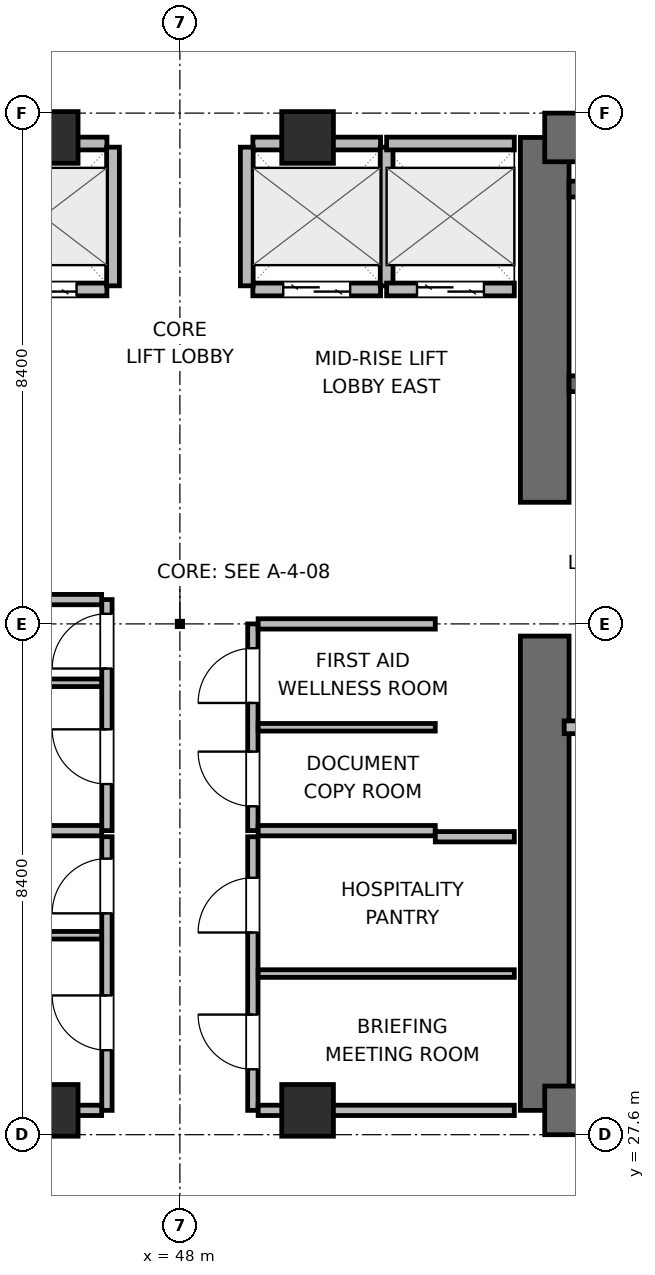
"""IFC4 building model, lengths in metres.
Left out: names, types, materials, properties, quantities, classifications, styles, units other than length and angle.
Written with IfcOpenShell. Run it as: python <this file> out.ifc"""

import sys

from ifc_helpers import new_model, si_unit, direction, frame, frame_2d, origin, origin_2d, place, context, subcontext, project, spatial, rectangle, extrude, element, fill, save


model = new_model("IFC4")
c1 = context("Model", 3, precision=1e-05, world=origin(), true_north=direction((0.0, 1.0)))
c2 = subcontext(c1, "Body", "Model", "MODEL_VIEW")
j1 = project(units=[si_unit("LENGTHUNIT", "METRE"), si_unit("PLANEANGLEUNIT", "RADIAN")], contexts=[c1])
p1 = place(None, origin())
s1 = spatial("IfcSite", under=j1, at=p1, CompositionType="ELEMENT")
p2 = place(p1, origin())
s2 = spatial("IfcBuilding", under=s1, at=p2, CompositionType="ELEMENT")
p3 = place(p2, frame((0.0, 0.0, 177.9)))
s3 = spatial("IfcBuildingStorey", under=s2, at=p3, CompositionType="ELEMENT", Elevation=177.9)
p4 = place(p3, frame((54.0, 28.0, 0.0), z_axis=(0.0, 0.0, 1.0), x_axis=(0.0, 1.0, 0.0)))
e1 = element("IfcWall", 1, at=p4, inside=s3, PredefinedType="SHEAR", context=c2, shape_type="SweptSolid", body=[
    extrude(rectangle(XDim=7.8, YDim=0.8, at=frame_2d((3.9, 0.0))), origin(), (0.0, 0.0, 1.0), 3.9),
])
p5 = place(p3, frame((54.0, 38.0, 0.0), z_axis=(0.0, 0.0, 1.0), x_axis=(0.0, 1.0, 0.0)))
e2 = element("IfcWall", 2, at=p5, inside=s3, PredefinedType="SHEAR", context=c2, shape_type="SweptSolid", body=[
    extrude(rectangle(XDim=6.0, YDim=0.8, at=frame_2d((3.0, 0.0))), origin(), (0.0, 0.0, 1.0), 3.9),
])
p6 = place(p3, frame((54.0, 28.0, 0.0), z_axis=(0.0, 0.0, 1.0), x_axis=(1.0, 0.0, 0.0)))
e3 = element("IfcWall", 3, at=p6, inside=s3, PredefinedType="SHEAR", context=c2, shape_type="SweptSolid", body=[
    extrude(rectangle(XDim=9.2, YDim=0.8, at=frame_2d((4.6, 0.0))), origin(), (0.0, 0.0, 1.0), 3.9),
])
p7 = place(p6, frame((3.975, 0.0, 0.0)))
e4 = element("IfcOpeningElement", 4, at=p7, cuts=e3, PredefinedType="OPENING", context=c2, shape_type="SweptSolid", body=[
    extrude(rectangle(XDim=1.05, YDim=2.04, at=frame_2d((0.525, 1.02))), frame((0.0, 0.41, 0.0), z_axis=(0.0, -1.0, 0.0), x_axis=(1.0, 0.0, 0.0)), (0.0, 0.0, 1.0), 0.82),
])
p8 = place(p3, frame((54.0, 44.0, 0.0), z_axis=(0.0, 0.0, 1.0), x_axis=(1.0, 0.0, 0.0)))
e5 = element("IfcWall", 5, at=p8, inside=s3, PredefinedType="SHEAR", context=c2, shape_type="SweptSolid", body=[
    extrude(rectangle(XDim=9.2, YDim=0.8, at=frame_2d((4.6, 0.0))), origin(), (0.0, 0.0, 1.0), 3.9),
])
p9 = place(p3, frame((54.4, 39.95, 0.0), z_axis=(0.0, 0.0, 1.0), x_axis=(1.0, 0.0, 0.0)))
e6 = element("IfcWall", 6, at=p9, inside=s3, PredefinedType="SHEAR", context=c2, shape_type="SweptSolid", body=[
    extrude(rectangle(XDim=8.4, YDim=0.26, at=frame_2d((4.2, 0.0))), origin(), (0.0, 0.0, 1.0), 3.9),
])
p10 = place(p9, frame((0.8, 0.0, 0.0)))
e7 = element("IfcOpeningElement", 7, at=p10, cuts=e6, PredefinedType="OPENING", context=c2, shape_type="SweptSolid", body=[
    extrude(rectangle(XDim=1.0, YDim=2.04, at=frame_2d((0.5, 1.02))), frame((0.0, 0.14, 0.0), z_axis=(0.0, -1.0, 0.0), x_axis=(1.0, 0.0, 0.0)), (0.0, 0.0, 1.0), 0.28),
])
p11 = place(p3, frame((54.4, 43.15, 0.0), z_axis=(0.0, 0.0, 1.0), x_axis=(1.0, 0.0, 0.0)))
e8 = element("IfcWall", 8, at=p11, inside=s3, PredefinedType="SHEAR", context=c2, shape_type="SweptSolid", body=[
    extrude(rectangle(XDim=8.4, YDim=0.26, at=frame_2d((4.2, 0.0))), origin(), (0.0, 0.0, 1.0), 3.9),
])
for number, where, z_axis, x_axis in (
    (9, (45.9, 28.0, 0.0), (0.0, 0.0, 1.0), (1.0, 0.0, 0.0)),
    (10, (50.1, 28.0, 0.0), (0.0, 0.0, 1.0), (1.0, 0.0, 0.0)),
    (11, (45.9, 44.0, 0.0), (0.0, 0.0, 1.0), (1.0, 0.0, 0.0)),
    (12, (50.1, 44.0, 0.0), (0.0, 0.0, 1.0), (1.0, 0.0, 0.0)),
):
    element("IfcColumn", number, at=place(p3, frame(where, z_axis=z_axis, x_axis=x_axis)), inside=s3, PredefinedType="COLUMN", context=c2, shape_type="SweptSolid", body=[
        extrude(rectangle(XDim=0.85, YDim=0.85, at=origin_2d()), origin(), (0.0, 0.0, 1.0), 3.9),
    ])
p12 = place(p3, frame((54.32, 34.3, 0.0), z_axis=(0.0, 0.0, 1.0), x_axis=(1.0, 0.0, 0.0)))
e13 = element("IfcWall", 13, at=p12, inside=s3, PredefinedType="PARTITIONING", context=c2, shape_type="SweptSolid", body=[
    extrude(rectangle(XDim=3.48, YDim=0.21, at=frame_2d((1.74, 0.0))), origin(), (0.0, 0.0, 1.0), 3.68),
])
p13 = place(p3, frame((44.7, 41.5, 0.0), z_axis=(0.0, 0.0, 1.0), x_axis=(1.0, 0.0, 0.0)))
e14 = element("IfcWall", 14, at=p13, inside=s3, PredefinedType="PARTITIONING", context=c2, shape_type="SweptSolid", body=[
    extrude(rectangle(XDim=2.1, YDim=0.21, at=frame_2d((1.05, 0.0))), origin(), (0.0, 0.0, 1.0), 3.68),
])
p14 = place(p13, frame((0.5, 0.0, 0.0)))
e15 = element("IfcOpeningElement", 15, at=p14, cuts=e14, PredefinedType="OPENING", context=c2, shape_type="SweptSolid", body=[
    extrude(rectangle(XDim=1.1, YDim=2.04, at=frame_2d((0.55, 1.02))), frame((0.0, 0.115, 0.0), z_axis=(0.0, -1.0, 0.0), x_axis=(1.0, 0.0, 0.0)), (0.0, 0.0, 1.0), 0.23),
])
p15 = place(p3, frame((44.7, 43.9, 0.0), z_axis=(0.0, 0.0, 1.0), x_axis=(1.0, 0.0, 0.0)))
e16 = element("IfcWall", 16, at=p15, inside=s3, PredefinedType="PARTITIONING", context=c2, shape_type="SweptSolid", body=[
    extrude(rectangle(XDim=2.1, YDim=0.21, at=frame_2d((1.05, 0.0))), origin(), (0.0, 0.0, 1.0), 2.765),
])
p16 = place(p3, frame((46.9, 41.56, 0.0), z_axis=(0.0, 0.0, 1.0), x_axis=(0.0, 1.0, 0.0)))
e17 = element("IfcWall", 17, at=p16, inside=s3, PredefinedType="PARTITIONING", context=c2, shape_type="SweptSolid", body=[
    extrude(rectangle(XDim=2.28, YDim=0.21, at=frame_2d((1.14, 0.0))), origin(), (0.0, 0.0, 1.0), 3.68),
])
p17 = place(p3, frame((49.2, 41.5, 0.0), z_axis=(0.0, 0.0, 1.0), x_axis=(1.0, 0.0, 0.0)))
e18 = element("IfcWall", 18, at=p17, inside=s3, PredefinedType="PARTITIONING", context=c2, shape_type="SweptSolid", body=[
    extrude(rectangle(XDim=2.1, YDim=0.21, at=frame_2d((1.05, 0.0))), origin(), (0.0, 0.0, 1.0), 3.68),
])
p18 = place(p17, frame((0.5, 0.0, 0.0)))
e19 = element("IfcOpeningElement", 19, at=p18, cuts=e18, PredefinedType="OPENING", context=c2, shape_type="SweptSolid", body=[
    extrude(rectangle(XDim=1.1, YDim=2.04, at=frame_2d((0.55, 1.02))), frame((0.0, 0.115, 0.0), z_axis=(0.0, -1.0, 0.0), x_axis=(1.0, 0.0, 0.0)), (0.0, 0.0, 1.0), 0.23),
])
p19 = place(p3, frame((49.2, 43.9, 0.0), z_axis=(0.0, 0.0, 1.0), x_axis=(1.0, 0.0, 0.0)))
e20 = element("IfcWall", 20, at=p19, inside=s3, PredefinedType="PARTITIONING", context=c2, shape_type="SweptSolid", body=[
    extrude(rectangle(XDim=2.1, YDim=0.21, at=frame_2d((1.05, 0.0))), origin(), (0.0, 0.0, 1.0), 2.765),
])
for number, where, z_axis, x_axis in (
    (21, (49.1, 41.56, 0.0), (0.0, 0.0, 1.0), (0.0, 1.0, 0.0)),
    (22, (51.4, 41.56, 0.0), (0.0, 0.0, 1.0), (0.0, 1.0, 0.0)),
):
    element("IfcWall", number, at=place(p3, frame(where, z_axis=z_axis, x_axis=x_axis)), inside=s3, PredefinedType="PARTITIONING", context=c2, shape_type="SweptSolid", body=[
        extrude(rectangle(XDim=2.28, YDim=0.21, at=frame_2d((1.14, 0.0))), origin(), (0.0, 0.0, 1.0), 3.68),
    ])
p20 = place(p3, frame((51.4, 41.5, 0.0), z_axis=(0.0, 0.0, 1.0), x_axis=(1.0, 0.0, 0.0)))
e23 = element("IfcWall", 23, at=p20, inside=s3, PredefinedType="PARTITIONING", context=c2, shape_type="SweptSolid", body=[
    extrude(rectangle(XDim=2.1, YDim=0.21, at=frame_2d((1.05, 0.0))), origin(), (0.0, 0.0, 1.0), 3.68),
])
p21 = place(p20, frame((0.5, 0.0, 0.0)))
e24 = element("IfcOpeningElement", 24, at=p21, cuts=e23, PredefinedType="OPENING", context=c2, shape_type="SweptSolid", body=[
    extrude(rectangle(XDim=1.1, YDim=2.04, at=frame_2d((0.55, 1.02))), frame((0.0, 0.115, 0.0), z_axis=(0.0, -1.0, 0.0), x_axis=(1.0, 0.0, 0.0)), (0.0, 0.0, 1.0), 0.23),
])
p22 = place(p3, frame((51.4, 43.9, 0.0), z_axis=(0.0, 0.0, 1.0), x_axis=(1.0, 0.0, 0.0)))
e25 = element("IfcWall", 25, at=p22, inside=s3, PredefinedType="PARTITIONING", context=c2, shape_type="SweptSolid", body=[
    extrude(rectangle(XDim=2.1, YDim=0.21, at=frame_2d((1.05, 0.0))), origin(), (0.0, 0.0, 1.0), 2.765),
])
p23 = place(p3, frame((46.8, 32.6, 0.0), z_axis=(0.0, 0.0, 1.0), x_axis=(0.0, 1.0, 0.0)))
e26 = element("IfcWall", 26, at=p23, inside=s3, PredefinedType="PARTITIONING", context=c2, shape_type="SweptSolid", body=[
    extrude(rectangle(XDim=3.8, YDim=0.17, at=frame_2d((1.9, 0.0))), origin(), (0.0, 0.0, 1.0), 3.68),
])
p24 = place(p23, frame((0.766, 0.0, 0.0)))
e27 = element("IfcOpeningElement", 27, at=p24, cuts=e26, PredefinedType="OPENING", context=c2, shape_type="SweptSolid", body=[
    extrude(rectangle(XDim=0.9, YDim=2.02, at=frame_2d((0.45, 1.01))), frame((0.0, 0.095, 0.0), z_axis=(0.0, -1.0, 0.0), x_axis=(1.0, 0.0, 0.0)), (0.0, 0.0, 1.0), 0.19),
])
p25 = place(p23, frame((2.666, 0.0, 0.0)))
e28 = element("IfcOpeningElement", 28, at=p25, cuts=e26, PredefinedType="OPENING", context=c2, shape_type="SweptSolid", body=[
    extrude(rectangle(XDim=0.9, YDim=2.02, at=frame_2d((0.45, 1.01))), frame((0.0, 0.095, 0.0), z_axis=(0.0, -1.0, 0.0), x_axis=(1.0, 0.0, 0.0)), (0.0, 0.0, 1.0), 0.19),
])
for number, where, z_axis, x_axis in (
    (29, (43.8, 32.6, 0.0), (0.0, 0.0, 1.0), (1.0, 0.0, 0.0)),
    (30, (43.8, 36.4, 0.0), (0.0, 0.0, 1.0), (1.0, 0.0, 0.0)),
):
    element("IfcWall", number, at=place(p3, frame(where, z_axis=z_axis, x_axis=x_axis)), inside=s3, PredefinedType="PARTITIONING", context=c2, shape_type="SweptSolid", body=[
        extrude(rectangle(XDim=2.913, YDim=0.17, at=frame_2d((1.457, 0.0))), origin(), (0.0, 0.0, 1.0), 3.68),
    ])
p26 = place(p3, frame((43.8, 35.032, 0.0), z_axis=(0.0, 0.0, 1.0), x_axis=(1.0, 0.0, 0.0)))
e31 = element("IfcWall", 31, at=p26, inside=s3, PredefinedType="PARTITIONING", context=c2, shape_type="SweptSolid", body=[
    extrude(rectangle(XDim=2.913, YDim=0.125, at=frame_2d((1.457, 0.0))), origin(), (0.0, 0.0, 1.0), 3.68),
])
p27 = place(p3, frame((49.2, 32.6, 0.0), z_axis=(0.0, 0.0, 1.0), x_axis=(0.0, 1.0, 0.0)))
e32 = element("IfcWall", 32, at=p27, inside=s3, PredefinedType="PARTITIONING", context=c2, shape_type="SweptSolid", body=[
    extrude(rectangle(XDim=3.4, YDim=0.17, at=frame_2d((1.7, 0.0))), origin(), (0.0, 0.0, 1.0), 3.68),
])
p28 = place(p27, frame((0.4, 0.0, 0.0)))
e33 = element("IfcOpeningElement", 33, at=p28, cuts=e32, PredefinedType="OPENING", context=c2, shape_type="SweptSolid", body=[
    extrude(rectangle(XDim=0.9, YDim=2.02, at=frame_2d((0.45, 1.01))), frame((0.0, 0.095, 0.0), z_axis=(0.0, -1.0, 0.0), x_axis=(1.0, 0.0, 0.0)), (0.0, 0.0, 1.0), 0.19),
])
p29 = place(p27, frame((2.1, 0.0, 0.0)))
e34 = element("IfcOpeningElement", 34, at=p29, cuts=e32, PredefinedType="OPENING", context=c2, shape_type="SweptSolid", body=[
    extrude(rectangle(XDim=0.9, YDim=2.02, at=frame_2d((0.45, 1.01))), frame((0.0, 0.095, 0.0), z_axis=(0.0, -1.0, 0.0), x_axis=(1.0, 0.0, 0.0)), (0.0, 0.0, 1.0), 0.19),
])
for number, where, z_axis, x_axis in (
    (35, (49.287, 32.6, 0.0), (0.0, 0.0, 1.0), (1.0, 0.0, 0.0)),
    (36, (49.287, 36.0, 0.0), (0.0, 0.0, 1.0), (1.0, 0.0, 0.0)),
):
    element("IfcWall", number, at=place(p3, frame(where, z_axis=z_axis, x_axis=x_axis)), inside=s3, PredefinedType="PARTITIONING", context=c2, shape_type="SweptSolid", body=[
        extrude(rectangle(XDim=2.913, YDim=0.17, at=frame_2d((1.457, 0.0))), origin(), (0.0, 0.0, 1.0), 3.68),
    ])
p30 = place(p3, frame((49.287, 34.3, 0.0), z_axis=(0.0, 0.0, 1.0), x_axis=(1.0, 0.0, 0.0)))
e37 = element("IfcWall", 37, at=p30, inside=s3, PredefinedType="PARTITIONING", context=c2, shape_type="SweptSolid", body=[
    extrude(rectangle(XDim=2.913, YDim=0.125, at=frame_2d((1.457, 0.0))), origin(), (0.0, 0.0, 1.0), 3.68),
])
p31 = place(p3, frame((46.8, 28.0, 0.0), z_axis=(0.0, 0.0, 1.0), x_axis=(0.0, 1.0, 0.0)))
e38 = element("IfcWall", 38, at=p31, inside=s3, PredefinedType="PARTITIONING", context=c2, shape_type="SweptSolid", body=[
    extrude(rectangle(XDim=4.5, YDim=0.17, at=frame_2d((2.25, 0.0))), origin(), (0.0, 0.0, 1.0), 3.68),
])
p32 = place(p31, frame((0.99, 0.0, 0.0)))
e39 = element("IfcOpeningElement", 39, at=p32, cuts=e38, PredefinedType="OPENING", context=c2, shape_type="SweptSolid", body=[
    extrude(rectangle(XDim=0.9, YDim=2.02, at=frame_2d((0.45, 1.01))), frame((0.0, 0.095, 0.0), z_axis=(0.0, -1.0, 0.0), x_axis=(1.0, 0.0, 0.0)), (0.0, 0.0, 1.0), 0.19),
])
p33 = place(p31, frame((3.24, 0.0, 0.0)))
e40 = element("IfcOpeningElement", 40, at=p33, cuts=e38, PredefinedType="OPENING", context=c2, shape_type="SweptSolid", body=[
    extrude(rectangle(XDim=0.9, YDim=2.02, at=frame_2d((0.45, 1.01))), frame((0.0, 0.095, 0.0), z_axis=(0.0, -1.0, 0.0), x_axis=(1.0, 0.0, 0.0)), (0.0, 0.0, 1.0), 0.19),
])
p34 = place(p3, frame((42.5, 28.0, 0.0), z_axis=(0.0, 0.0, 1.0), x_axis=(1.0, 0.0, 0.0)))
e41 = element("IfcWall", 41, at=p34, inside=s3, PredefinedType="PARTITIONING", context=c2, shape_type="SweptSolid", body=[
    extrude(rectangle(XDim=4.213, YDim=0.17, at=frame_2d((2.106, 0.0))), origin(), (0.0, 0.0, 1.0), 2.765),
])
p35 = place(p3, frame((42.5, 30.88, 0.0), z_axis=(0.0, 0.0, 1.0), x_axis=(1.0, 0.0, 0.0)))
e42 = element("IfcWall", 42, at=p35, inside=s3, PredefinedType="PARTITIONING", context=c2, shape_type="SweptSolid", body=[
    extrude(rectangle(XDim=4.213, YDim=0.125, at=frame_2d((2.106, 0.0))), origin(), (0.0, 0.0, 1.0), 3.68),
])
p36 = place(p3, frame((49.2, 28.0, 0.0), z_axis=(0.0, 0.0, 1.0), x_axis=(0.0, 1.0, 0.0)))
e43 = element("IfcWall", 43, at=p36, inside=s3, PredefinedType="PARTITIONING", context=c2, shape_type="SweptSolid", body=[
    extrude(rectangle(XDim=4.5, YDim=0.17, at=frame_2d((2.25, 0.0))), origin(), (0.0, 0.0, 1.0), 3.68),
])
p37 = place(p36, frame((0.675, 0.0, 0.0)))
e44 = element("IfcOpeningElement", 44, at=p37, cuts=e43, PredefinedType="OPENING", context=c2, shape_type="SweptSolid", body=[
    extrude(rectangle(XDim=0.9, YDim=2.02, at=frame_2d((0.45, 1.01))), frame((0.0, 0.095, 0.0), z_axis=(0.0, -1.0, 0.0), x_axis=(1.0, 0.0, 0.0)), (0.0, 0.0, 1.0), 0.19),
])
p38 = place(p36, frame((2.925, 0.0, 0.0)))
e45 = element("IfcOpeningElement", 45, at=p38, cuts=e43, PredefinedType="OPENING", context=c2, shape_type="SweptSolid", body=[
    extrude(rectangle(XDim=0.9, YDim=2.02, at=frame_2d((0.45, 1.01))), frame((0.0, 0.095, 0.0), z_axis=(0.0, -1.0, 0.0), x_axis=(1.0, 0.0, 0.0)), (0.0, 0.0, 1.0), 0.19),
])
p39 = place(p3, frame((49.287, 28.0, 0.0), z_axis=(0.0, 0.0, 1.0), x_axis=(1.0, 0.0, 0.0)))
e46 = element("IfcWall", 46, at=p39, inside=s3, PredefinedType="PARTITIONING", context=c2, shape_type="SweptSolid", body=[
    extrude(rectangle(XDim=4.213, YDim=0.17, at=frame_2d((2.106, 0.0))), origin(), (0.0, 0.0, 1.0), 2.765),
])
p40 = place(p3, frame((52.2, 32.5, 0.0), z_axis=(0.0, 0.0, 1.0), x_axis=(1.0, 0.0, 0.0)))
e47 = element("IfcWall", 47, at=p40, inside=s3, PredefinedType="PARTITIONING", context=c2, shape_type="SweptSolid", body=[
    extrude(rectangle(XDim=1.3, YDim=0.17, at=frame_2d((0.65, 0.0))), origin(), (0.0, 0.0, 1.0), 3.68),
])
p41 = place(p3, frame((49.287, 30.25, 0.0), z_axis=(0.0, 0.0, 1.0), x_axis=(1.0, 0.0, 0.0)))
e48 = element("IfcWall", 48, at=p41, inside=s3, PredefinedType="PARTITIONING", context=c2, shape_type="SweptSolid", body=[
    extrude(rectangle(XDim=4.213, YDim=0.125, at=frame_2d((2.106, 0.0))), origin(), (0.0, 0.0, 1.0), 3.68),
])
p42 = place(p14, origin())
e49 = element("IfcDoor", 49, at=p42, inside=s3, OperationType="DOUBLE_DOOR_SLIDING", PredefinedType="DOOR", context=c2, shape_type="SweptSolid", body=[
    extrude(rectangle(XDim=1.1, YDim=2.04, at=frame_2d((0.55, 1.02))), frame((0.0, 0.025, 0.0), z_axis=(0.0, -1.0, 0.0), x_axis=(1.0, 0.0, 0.0)), (0.0, 0.0, 1.0), 0.05),
])
fill(e15, e49)
p43 = place(p18, origin())
e50 = element("IfcDoor", 50, at=p43, inside=s3, OperationType="DOUBLE_DOOR_SLIDING", PredefinedType="DOOR", context=c2, shape_type="SweptSolid", body=[
    extrude(rectangle(XDim=1.1, YDim=2.04, at=frame_2d((0.55, 1.02))), frame((0.0, 0.025, 0.0), z_axis=(0.0, -1.0, 0.0), x_axis=(1.0, 0.0, 0.0)), (0.0, 0.0, 1.0), 0.05),
])
fill(e19, e50)
p44 = place(p21, origin())
e51 = element("IfcDoor", 51, at=p44, inside=s3, OperationType="DOUBLE_DOOR_SLIDING", PredefinedType="DOOR", context=c2, shape_type="SweptSolid", body=[
    extrude(rectangle(XDim=1.1, YDim=2.04, at=frame_2d((0.55, 1.02))), frame((0.0, 0.025, 0.0), z_axis=(0.0, -1.0, 0.0), x_axis=(1.0, 0.0, 0.0)), (0.0, 0.0, 1.0), 0.05),
])
fill(e24, e51)
p45 = place(p24, origin())
e52 = element("IfcDoor", 52, at=p45, inside=s3, OperationType="SINGLE_SWING_RIGHT", PredefinedType="DOOR", context=c2, shape_type="SweptSolid", body=[
    extrude(rectangle(XDim=0.9, YDim=2.02, at=frame_2d((0.45, 1.01))), frame((0.0, 0.025, 0.0), z_axis=(0.0, -1.0, 0.0), x_axis=(1.0, 0.0, 0.0)), (0.0, 0.0, 1.0), 0.05),
])
fill(e27, e52)
p46 = place(p25, origin())
e53 = element("IfcDoor", 53, at=p46, inside=s3, OperationType="SINGLE_SWING_LEFT", PredefinedType="DOOR", context=c2, shape_type="SweptSolid", body=[
    extrude(rectangle(XDim=0.9, YDim=2.02, at=frame_2d((0.45, 1.01))), frame((0.0, 0.025, 0.0), z_axis=(0.0, -1.0, 0.0), x_axis=(1.0, 0.0, 0.0)), (0.0, 0.0, 1.0), 0.05),
])
fill(e28, e53)
p47 = place(p28, origin())
e54 = element("IfcDoor", 54, at=p47, inside=s3, OperationType="SINGLE_SWING_RIGHT", PredefinedType="DOOR", context=c2, shape_type="SweptSolid", body=[
    extrude(rectangle(XDim=0.9, YDim=2.02, at=frame_2d((0.45, 1.01))), frame((0.0, 0.025, 0.0), z_axis=(0.0, -1.0, 0.0), x_axis=(1.0, 0.0, 0.0)), (0.0, 0.0, 1.0), 0.05),
])
fill(e33, e54)
p48 = place(p29, origin())
e55 = element("IfcDoor", 55, at=p48, inside=s3, OperationType="SINGLE_SWING_LEFT", PredefinedType="DOOR", context=c2, shape_type="SweptSolid", body=[
    extrude(rectangle(XDim=0.9, YDim=2.02, at=frame_2d((0.45, 1.01))), frame((0.0, 0.025, 0.0), z_axis=(0.0, -1.0, 0.0), x_axis=(1.0, 0.0, 0.0)), (0.0, 0.0, 1.0), 0.05),
])
fill(e34, e55)
p49 = place(p32, origin())
e56 = element("IfcDoor", 56, at=p49, inside=s3, OperationType="SINGLE_SWING_RIGHT", PredefinedType="DOOR", context=c2, shape_type="SweptSolid", body=[
    extrude(rectangle(XDim=0.9, YDim=2.02, at=frame_2d((0.45, 1.01))), frame((0.0, 0.025, 0.0), z_axis=(0.0, -1.0, 0.0), x_axis=(1.0, 0.0, 0.0)), (0.0, 0.0, 1.0), 0.05),
])
fill(e39, e56)
p50 = place(p33, origin())
e57 = element("IfcDoor", 57, at=p50, inside=s3, OperationType="SINGLE_SWING_LEFT", PredefinedType="DOOR", context=c2, shape_type="SweptSolid", body=[
    extrude(rectangle(XDim=0.9, YDim=2.02, at=frame_2d((0.45, 1.01))), frame((0.0, 0.025, 0.0), z_axis=(0.0, -1.0, 0.0), x_axis=(1.0, 0.0, 0.0)), (0.0, 0.0, 1.0), 0.05),
])
fill(e40, e57)
p51 = place(p37, origin())
e58 = element("IfcDoor", 58, at=p51, inside=s3, OperationType="SINGLE_SWING_RIGHT", PredefinedType="DOOR", context=c2, shape_type="SweptSolid", body=[
    extrude(rectangle(XDim=0.9, YDim=2.02, at=frame_2d((0.45, 1.01))), frame((0.0, 0.025, 0.0), z_axis=(0.0, -1.0, 0.0), x_axis=(1.0, 0.0, 0.0)), (0.0, 0.0, 1.0), 0.05),
])
fill(e44, e58)
p52 = place(p38, origin())
e59 = element("IfcDoor", 59, at=p52, inside=s3, OperationType="SINGLE_SWING_LEFT", PredefinedType="DOOR", context=c2, shape_type="SweptSolid", body=[
    extrude(rectangle(XDim=0.9, YDim=2.02, at=frame_2d((0.45, 1.01))), frame((0.0, 0.025, 0.0), z_axis=(0.0, -1.0, 0.0), x_axis=(1.0, 0.0, 0.0)), (0.0, 0.0, 1.0), 0.05),
])
fill(e45, e59)
save(model, sys.argv[1])
